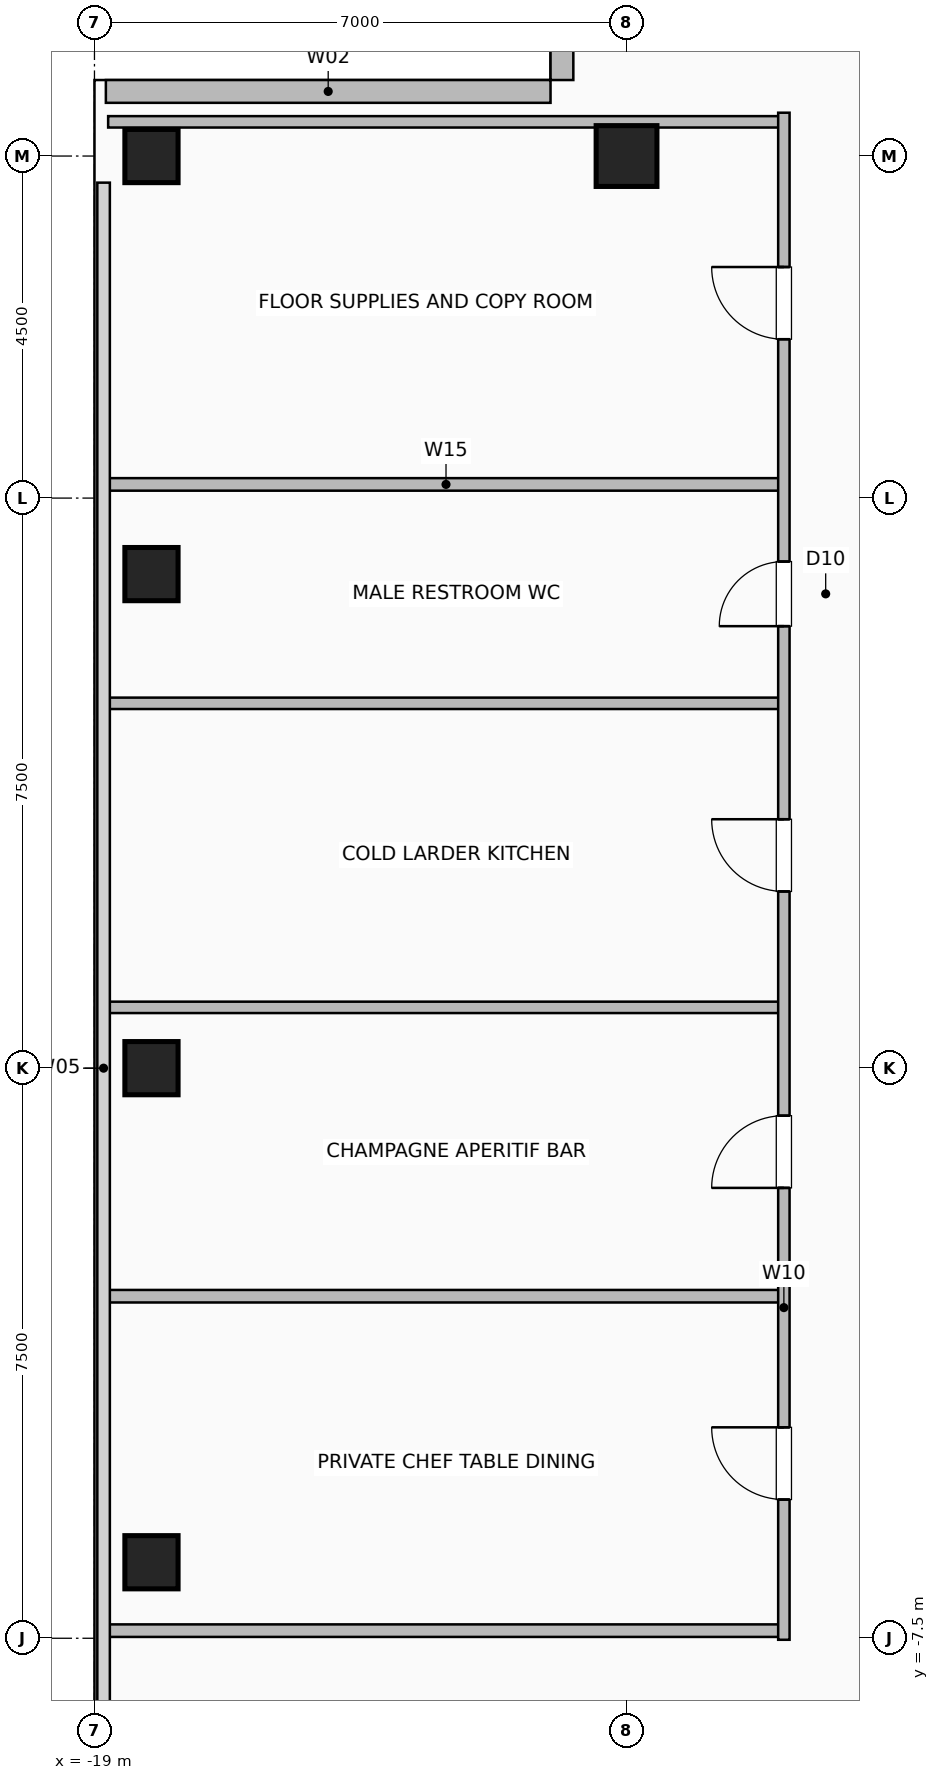
"""IFC4 building model, lengths in metres.
Left out: names, types, materials, properties, quantities, classifications, styles, units other than length and angle.
Written with IfcOpenShell. Run it as: python <this file> out.ifc"""

import sys

from ifc_helpers import new_model, si_unit, direction, frame, frame_2d, origin, origin_2d, place, context, subcontext, project, spatial, rectangle, hollow_rectangle, extrude, element, fill, save


model = new_model("IFC4")
c1 = context("Model", 3, precision=1e-05, world=origin(), true_north=direction((0.0, 1.0)))
c2 = subcontext(c1, "Body", "Model", "MODEL_VIEW")
j1 = project(units=[si_unit("LENGTHUNIT", "METRE"), si_unit("PLANEANGLEUNIT", "RADIAN")], contexts=[c1])
p1 = place(None, origin())
s1 = spatial("IfcSite", under=j1, at=p1, CompositionType="ELEMENT")
p2 = place(p1, origin())
s2 = spatial("IfcBuilding", under=s1, at=p2, CompositionType="ELEMENT")
p3 = place(p2, frame((0.0, 0.0, 297.2)))
s3 = spatial("IfcBuildingStorey", under=s2, at=p3, CompositionType="ELEMENT", Elevation=297.2)
for number, where, z_axis, x_axis in (
    (1, (-18.25, -6.5, 0.0), (0.0, 0.0, 1.0), (1.0, 0.0, 0.0)),
    (2, (-18.25, 0.0, 0.0), (0.0, 0.0, 1.0), (1.0, 0.0, 0.0)),
    (3, (-18.25, 6.5, 0.0), (0.0, 0.0, 1.0), (1.0, 0.0, 0.0)),
    (4, (-18.25, 12.0, 0.0), (0.0, 0.0, 1.0), (1.0, 0.0, 0.0)),
):
    element("IfcColumn", number, at=place(p3, frame(where, z_axis=z_axis, x_axis=x_axis)), inside=s3, PredefinedType="COLUMN", context=c2, shape_type="SweptSolid", body=[
        extrude(hollow_rectangle(XDim=0.7, YDim=0.7, WallThickness=0.035, at=origin_2d()), origin(), (0.0, 0.0, 1.0), 3.2),
    ])
p4 = place(p3, frame((-12.0, 12.0, 0.0), z_axis=(0.0, 0.0, 1.0), x_axis=(1.0, 0.0, 0.0)))
e5 = element("IfcColumn", 5, at=p4, inside=s3, PredefinedType="COLUMN", context=c2, shape_type="SweptSolid", body=[
    extrude(hollow_rectangle(XDim=0.8, YDim=0.8, WallThickness=0.04, at=origin_2d()), origin(), (0.0, 0.0, 1.0), 3.2),
])
p5 = place(p3, frame((-12.85, 18.85, 0.0), z_axis=(0.0, 0.0, 1.0), x_axis=(0.0, -1.0, 0.0)))
e6 = element("IfcWall", 6, at=p5, inside=s3, PredefinedType="SOLIDWALL", context=c2, shape_type="SweptSolid", body=[
    extrude(rectangle(XDim=5.85, YDim=0.3, at=frame_2d((2.925, 0.0))), origin(), (0.0, 0.0, 1.0), 3.2),
])
p6 = place(p5, frame((2.175, 0.0, 0.9)))
e7 = element("IfcOpeningElement", 7, at=p6, cuts=e6, PredefinedType="OPENING", context=c2, shape_type="SweptSolid", body=[
    extrude(rectangle(XDim=1.5, YDim=1.8, at=frame_2d((0.75, 0.9))), frame((0.0, 0.16, 0.0), z_axis=(0.0, -1.0, 0.0), x_axis=(1.0, 0.0, 0.0)), (0.0, 0.0, 1.0), 0.32),
])
p7 = place(p3, frame((-18.85, 12.85, 0.0), z_axis=(0.0, 0.0, 1.0), x_axis=(1.0, 0.0, 0.0)))
e8 = element("IfcWall", 8, at=p7, inside=s3, PredefinedType="SOLIDWALL", context=c2, shape_type="SweptSolid", body=[
    extrude(rectangle(XDim=5.85, YDim=0.3, at=frame_2d((2.925, 0.0))), origin(), (0.0, 0.0, 1.0), 3.2),
])
for number, where, z_axis, x_axis in (
    (9, (-18.82, 7.68, 0.0), (0.0, 0.0, 1.0), (1.0, 0.0, 0.0)),
    (10, (-18.82, -7.4, 0.0), (0.0, 0.0, 1.0), (1.0, 0.0, 0.0)),
):
    element("IfcWall", number, at=place(p3, frame(where, z_axis=z_axis, x_axis=x_axis)), inside=s3, PredefinedType="PLUMBINGWALL", context=c2, shape_type="SweptSolid", body=[
        extrude(rectangle(XDim=8.89, YDim=0.165, at=frame_2d((4.445, 0.0))), origin(), (0.0, 0.0, 1.0), 2.075),
    ])
p8 = place(p3, frame((-18.82, -3.0, 0.0), z_axis=(0.0, 0.0, 1.0), x_axis=(1.0, 0.0, 0.0)))
e11 = element("IfcWall", 11, at=p8, inside=s3, PredefinedType="PLUMBINGWALL", context=c2, shape_type="SweptSolid", body=[
    extrude(rectangle(XDim=8.89, YDim=0.165, at=frame_2d((4.445, 0.0))), origin(), (0.0, 0.0, 1.0), 3.2),
])
for number, where, z_axis, x_axis in (
    (12, (-18.82, 0.8, 0.0), (0.0, 0.0, 1.0), (1.0, 0.0, 0.0)),
    (13, (-18.82, 4.8, 0.0), (0.0, 0.0, 1.0), (1.0, 0.0, 0.0)),
    (14, (-18.82, 12.45, 0.0), (0.0, 0.0, 1.0), (1.0, 0.0, 0.0)),
):
    element("IfcWall", number, at=place(p3, frame(where, z_axis=z_axis, x_axis=x_axis)), inside=s3, PredefinedType="PARTITIONING", context=c2, shape_type="SweptSolid", body=[
        extrude(rectangle(XDim=8.89, YDim=0.15, at=frame_2d((4.445, 0.0))), origin(), (0.0, 0.0, 1.0), 3.2),
    ])
p9 = place(p3, frame((-9.93, -7.52, 0.0), z_axis=(0.0, 0.0, 1.0), x_axis=(0.0, 1.0, 0.0)))
e15 = element("IfcWall", 15, at=p9, inside=s3, PredefinedType="PARTITIONING", context=c2, shape_type="SweptSolid", body=[
    extrude(rectangle(XDim=20.09, YDim=0.15, at=frame_2d((10.045, 0.0))), origin(), (0.0, 0.0, 1.0), 3.2),
])
p10 = place(p9, frame((1.845, 0.0, 0.0)))
e16 = element("IfcOpeningElement", 16, at=p10, cuts=e15, PredefinedType="OPENING", context=c2, shape_type="SweptSolid", body=[
    extrude(rectangle(XDim=0.95, YDim=2.06, at=frame_2d((0.475, 1.03))), frame((0.0, 0.085, 0.0), z_axis=(0.0, -1.0, 0.0), x_axis=(1.0, 0.0, 0.0)), (0.0, 0.0, 1.0), 0.17),
])
p11 = place(p9, frame((5.945, 0.0, 0.0)))
e17 = element("IfcOpeningElement", 17, at=p11, cuts=e15, PredefinedType="OPENING", context=c2, shape_type="SweptSolid", body=[
    extrude(rectangle(XDim=0.95, YDim=2.06, at=frame_2d((0.475, 1.03))), frame((0.0, 0.085, 0.0), z_axis=(0.0, -1.0, 0.0), x_axis=(1.0, 0.0, 0.0)), (0.0, 0.0, 1.0), 0.17),
])
p12 = place(p9, frame((9.845, 0.0, 0.0)))
e18 = element("IfcOpeningElement", 18, at=p12, cuts=e15, PredefinedType="OPENING", context=c2, shape_type="SweptSolid", body=[
    extrude(rectangle(XDim=0.95, YDim=2.06, at=frame_2d((0.475, 1.03))), frame((0.0, 0.085, 0.0), z_axis=(0.0, -1.0, 0.0), x_axis=(1.0, 0.0, 0.0)), (0.0, 0.0, 1.0), 0.17),
])
p13 = place(p9, frame((13.335, 0.0, 0.0)))
e19 = element("IfcOpeningElement", 19, at=p13, cuts=e15, PredefinedType="OPENING", context=c2, shape_type="SweptSolid", body=[
    extrude(rectangle(XDim=0.85, YDim=2.05, at=frame_2d((0.425, 1.025))), frame((0.0, 0.085, 0.0), z_axis=(0.0, -1.0, 0.0), x_axis=(1.0, 0.0, 0.0)), (0.0, 0.0, 1.0), 0.17),
])
p14 = place(p9, frame((17.11, 0.0, 0.0)))
e20 = element("IfcOpeningElement", 20, at=p14, cuts=e15, PredefinedType="OPENING", context=c2, shape_type="SweptSolid", body=[
    extrude(rectangle(XDim=0.95, YDim=2.06, at=frame_2d((0.475, 1.03))), frame((0.0, 0.085, 0.0), z_axis=(0.0, -1.0, 0.0), x_axis=(1.0, 0.0, 0.0)), (0.0, 0.0, 1.0), 0.17),
])
p15 = place(p10, origin())
e21 = element("IfcDoor", 21, at=p15, inside=s3, OperationType="SINGLE_SWING_RIGHT", PredefinedType="DOOR", context=c2, shape_type="SweptSolid", body=[
    extrude(rectangle(XDim=0.95, YDim=2.06, at=frame_2d((0.475, 1.03))), frame((0.0, 0.025, 0.0), z_axis=(0.0, -1.0, 0.0), x_axis=(1.0, 0.0, 0.0)), (0.0, 0.0, 1.0), 0.05),
])
fill(e16, e21)
p16 = place(p11, origin())
e22 = element("IfcDoor", 22, at=p16, inside=s3, OperationType="SINGLE_SWING_LEFT", PredefinedType="DOOR", context=c2, shape_type="SweptSolid", body=[
    extrude(rectangle(XDim=0.95, YDim=2.06, at=frame_2d((0.475, 1.03))), frame((0.0, 0.025, 0.0), z_axis=(0.0, -1.0, 0.0), x_axis=(1.0, 0.0, 0.0)), (0.0, 0.0, 1.0), 0.05),
])
fill(e17, e22)
p17 = place(p12, origin())
e23 = element("IfcDoor", 23, at=p17, inside=s3, OperationType="SINGLE_SWING_RIGHT", PredefinedType="DOOR", context=c2, shape_type="SweptSolid", body=[
    extrude(rectangle(XDim=0.95, YDim=2.06, at=frame_2d((0.475, 1.03))), frame((0.0, 0.025, 0.0), z_axis=(0.0, -1.0, 0.0), x_axis=(1.0, 0.0, 0.0)), (0.0, 0.0, 1.0), 0.05),
])
fill(e18, e23)
p18 = place(p13, origin())
e24 = element("IfcDoor", 24, at=p18, inside=s3, OperationType="SINGLE_SWING_LEFT", PredefinedType="DOOR", context=c2, shape_type="SweptSolid", body=[
    extrude(rectangle(XDim=0.85, YDim=2.05, at=frame_2d((0.425, 1.025))), frame((0.0, 0.025, 0.0), z_axis=(0.0, -1.0, 0.0), x_axis=(1.0, 0.0, 0.0)), (0.0, 0.0, 1.0), 0.05),
])
fill(e19, e24)
p19 = place(p14, origin())
e25 = element("IfcDoor", 25, at=p19, inside=s3, OperationType="SINGLE_SWING_RIGHT", PredefinedType="DOOR", context=c2, shape_type="SweptSolid", body=[
    extrude(rectangle(XDim=0.95, YDim=2.06, at=frame_2d((0.475, 1.03))), frame((0.0, 0.025, 0.0), z_axis=(0.0, -1.0, 0.0), x_axis=(1.0, 0.0, 0.0)), (0.0, 0.0, 1.0), 0.05),
])
fill(e20, e25)
save(model, sys.argv[1])
